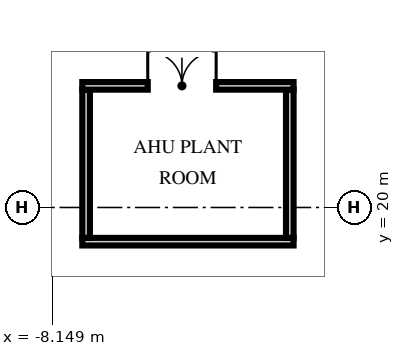
"""IFC4 building model, lengths in metres.
Left out: names, types, materials, properties, quantities, classifications, styles, units other than length and angle.
Written with IfcOpenShell. Run it as: python <this file> out.ifc"""

import sys

from ifc_helpers import new_model, si_unit, direction, frame, frame_2d, origin, origin_2d, place, context, subcontext, project, spatial, rectangle, hollow_rectangle, extrude, element, fill, save


model = new_model("IFC4")
c1 = context("Model", 3, precision=1e-05, world=origin(), true_north=direction((0.0, 1.0)))
c2 = subcontext(c1, "Body", "Model", "MODEL_VIEW")
j1 = project(units=[si_unit("LENGTHUNIT", "METRE"), si_unit("PLANEANGLEUNIT", "RADIAN")], contexts=[c1])
p1 = place(None, origin())
s1 = spatial("IfcSite", under=j1, at=p1, CompositionType="ELEMENT")
p2 = place(p1, origin())
s2 = spatial("IfcBuilding", under=s1, at=p2, CompositionType="ELEMENT")
p3 = place(p2, frame((0.0, 0.0, 192.0)))
s3 = spatial("IfcBuildingStorey", under=s2, at=p3, CompositionType="ELEMENT", Elevation=192.0)
p4 = place(p3, frame((-9.16, 27.1, -0.65), z_axis=(0.103570687408, -0.332991803119, 0.937224397765), x_axis=(0.994622092871, 0.034607128924, -0.097617821118)))
e1 = element("IfcColumn", 1, at=p4, inside=s3, PredefinedType="COLUMN", context=c2, shape_type="SweptSolid", body=[
    extrude(hollow_rectangle(XDim=3.2, YDim=1.8, WallThickness=0.2, at=origin_2d()), origin(), (0.0, 0.0, 1.0), 8.109),
])
p5 = place(p3, frame((0.0, 27.1, -0.65), z_axis=(0.0, -0.334792284074, 0.942291953974), x_axis=(1.0, 0.0, 0.0)))
e2 = element("IfcColumn", 2, at=p5, inside=s3, PredefinedType="COLUMN", context=c2, shape_type="SweptSolid", body=[
    extrude(hollow_rectangle(XDim=3.2, YDim=1.8, WallThickness=0.2, at=origin_2d()), origin(), (0.0, 0.0, 1.0), 8.065),
])
p6 = place(p3, frame((-7.36, 19.1, 0.0), z_axis=(0.0, 0.0, 1.0), x_axis=(1.0, 0.0, 0.0)))
e3 = element("IfcWall", 3, at=p6, inside=s3, PredefinedType="SOLIDWALL", context=c2, shape_type="SweptSolid", body=[
    extrude(rectangle(XDim=5.56, YDim=0.2, at=frame_2d((2.78, 0.0))), origin(), (0.0, 0.0, 1.0), 6.56),
])
for number, where, z_axis, x_axis in (
    (4, (-7.26, 19.2, 0.0), (0.0, 0.0, 1.0), (0.0, 1.0, 0.0)),
    (5, (-1.9, 19.2, 0.0), (0.0, 0.0, 1.0), (0.0, 1.0, 0.0)),
):
    element("IfcWall", number, at=place(p3, frame(where, z_axis=z_axis, x_axis=x_axis)), inside=s3, PredefinedType="SOLIDWALL", context=c2, shape_type="SweptSolid", body=[
        extrude(rectangle(XDim=3.9, YDim=0.2, at=frame_2d((1.95, 0.0))), origin(), (0.0, 0.0, 1.0), 7.25),
    ])
p7 = place(p3, frame((-7.36, 23.2, 0.0), z_axis=(0.0, 0.0, 1.0), x_axis=(1.0, 0.0, 0.0)))
e6 = element("IfcWall", 6, at=p7, inside=s3, PredefinedType="SOLIDWALL", context=c2, shape_type="SweptSolid", body=[
    extrude(rectangle(XDim=5.56, YDim=0.2, at=frame_2d((2.78, 0.0))), origin(), (0.0, 0.0, 1.0), 6.56),
])
p8 = place(p7, frame((1.722, 0.0, 0.0)))
e7 = element("IfcOpeningElement", 7, at=p8, cuts=e6, PredefinedType="OPENING", context=c2, shape_type="SweptSolid", body=[
    extrude(rectangle(XDim=1.8, YDim=2.4, at=frame_2d((0.9, 1.2))), frame((0.0, 0.11, 0.0), z_axis=(0.0, -1.0, 0.0), x_axis=(1.0, 0.0, 0.0)), (0.0, 0.0, 1.0), 0.22),
])
p9 = place(p8, origin())
e8 = element("IfcDoor", 8, at=p9, inside=s3, OperationType="DOUBLE_DOOR_SINGLE_SWING", PredefinedType="DOOR", context=c2, shape_type="SweptSolid", body=[
    extrude(rectangle(XDim=1.8, YDim=2.4, at=frame_2d((0.9, 1.2))), frame((0.0, 0.025, 0.0), z_axis=(0.0, -1.0, 0.0), x_axis=(1.0, 0.0, 0.0)), (0.0, 0.0, 1.0), 0.05),
])
fill(e7, e8)
save(model, sys.argv[1])
